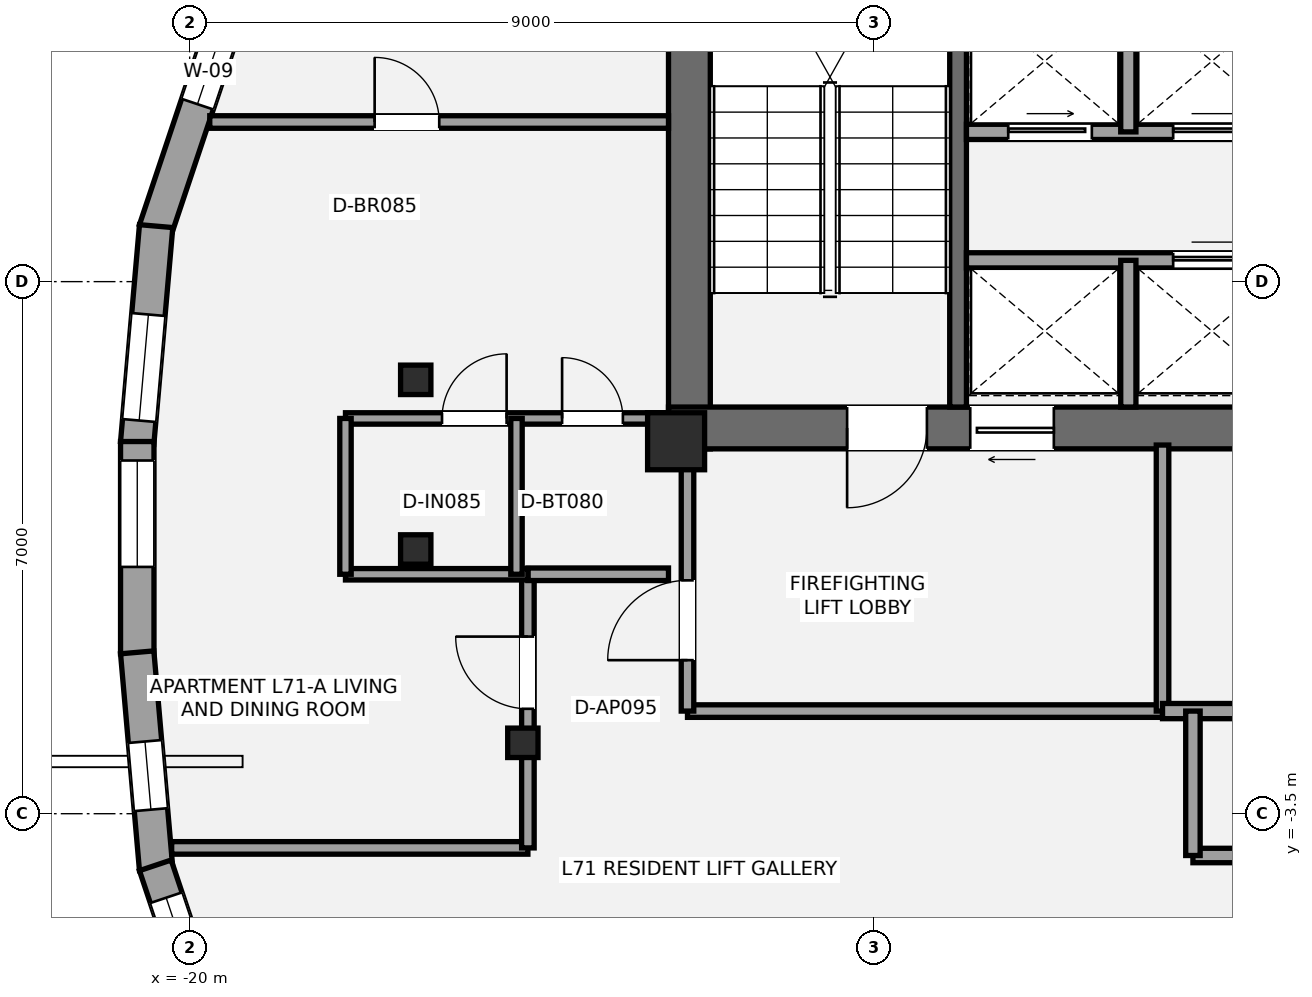
"""IFC4 building model, lengths in metres.
Left out: names, types, materials, properties, quantities, classifications, styles, units other than length and angle.
Written with IfcOpenShell. Run it as: python <this file> out.ifc"""

import sys

from ifc_helpers import new_model, si_unit, direction, frame, frame_2d, origin, origin_2d, place, context, subcontext, project, spatial, rectangle, i_section, extrude, element, fill, save


model = new_model("IFC4")
c1 = context("Model", 3, precision=1e-05, world=origin(), true_north=direction((0.0, 1.0)))
c2 = subcontext(c1, "Body", "Model", "MODEL_VIEW")
j1 = project(units=[si_unit("LENGTHUNIT", "METRE"), si_unit("PLANEANGLEUNIT", "RADIAN")], contexts=[c1])
p1 = place(None, origin())
s1 = spatial("IfcSite", under=j1, at=p1, CompositionType="ELEMENT")
p2 = place(p1, origin())
s2 = spatial("IfcBuilding", under=s1, at=p2, CompositionType="ELEMENT")
p3 = place(p2, frame((0.0, 0.0, 250.95)))
s3 = spatial("IfcBuildingStorey", under=s2, at=p3, CompositionType="ELEMENT", Elevation=250.95)
p4 = place(p3, frame((-13.425, 1.3, 0.0), z_axis=(0.0, 0.0, 1.0), x_axis=(0.0, 1.0, 0.0)))
e1 = element("IfcWall", 1, at=p4, inside=s3, PredefinedType="SHEAR", context=c2, shape_type="SweptSolid", body=[
    extrude(rectangle(XDim=8.25, YDim=0.55, at=frame_2d((4.125, 0.0))), origin(), (0.0, 0.0, 1.0), 3.15),
])
p5 = place(p3, frame((-4.925, 1.575, 0.0), z_axis=(0.0, 0.0, 1.0), x_axis=(-1.0, 0.0, 0.0)))
e2 = element("IfcWall", 2, at=p5, inside=s3, PredefinedType="SHEAR", context=c2, shape_type="SweptSolid", body=[
    extrude(rectangle(XDim=8.775, YDim=0.55, at=frame_2d((4.387, 0.0))), origin(), (0.0, 0.0, 1.0), 3.15),
])
p6 = place(p5, frame((5.375, 0.0, 0.0)))
e3 = element("IfcOpeningElement", 3, at=p6, cuts=e2, PredefinedType="OPENING", context=c2, shape_type="SweptSolid", body=[
    extrude(rectangle(XDim=1.05, YDim=2.15, at=frame_2d((0.525, 1.075))), frame((0.0, 0.285, 0.0), z_axis=(0.0, -1.0, 0.0), x_axis=(1.0, 0.0, 0.0)), (0.0, 0.0, 1.0), 0.57),
])
p7 = place(p5, frame((3.705, 0.0, 0.0)))
e4 = element("IfcOpeningElement", 4, at=p7, cuts=e2, PredefinedType="OPENING", context=c2, shape_type="SweptSolid", body=[
    extrude(rectangle(XDim=1.1, YDim=2.2, at=frame_2d((0.55, 1.1))), frame((0.0, 0.285, 0.0), z_axis=(0.0, -1.0, 0.0), x_axis=(1.0, 0.0, 0.0)), (0.0, 0.0, 1.0), 0.57),
])
p8 = place(p3, frame((-9.89, 1.85, 0.0), z_axis=(0.0, 0.0, 1.0), x_axis=(0.0, 1.0, 0.0)))
e5 = element("IfcWall", 5, at=p8, inside=s3, PredefinedType="SHEAR", context=c2, shape_type="SweptSolid", body=[
    extrude(rectangle(XDim=7.15, YDim=0.22, at=frame_2d((3.575, 0.0))), origin(), (0.0, 0.0, 1.0), 3.15),
])
p9 = place(p3, frame((-13.6, 1.4, 0.0), z_axis=(0.0, 0.0, 1.0), x_axis=(1.0, 0.0, 0.0)))
e6 = element("IfcColumn", 6, at=p9, inside=s3, PredefinedType="PILASTER", context=c2, shape_type="SweptSolid", body=[
    extrude(rectangle(XDim=0.75, YDim=0.75, at=origin_2d()), origin(), (0.0, 0.0, 1.0), 3.15),
])
for number, where, z_axis, x_axis in (
    (7, (-17.026, 2.208, 0.0), (0.0, 0.0, 1.0), (1.0, 0.0, 0.0)),
    (8, (-17.026, -0.024, 0.0), (0.0, 0.0, 1.0), (1.0, 0.0, 0.0)),
    (9, (-15.616, -2.567, 0.0), (0.0, 0.0, 1.0), (1.0, 0.0, 0.0)),
):
    element("IfcColumn", number, at=place(p3, frame(where, z_axis=z_axis, x_axis=x_axis)), inside=s3, PredefinedType="COLUMN", context=c2, shape_type="SweptSolid", body=[
        extrude(i_section(OverallWidth=0.399, OverallDepth=0.387, WebThickness=0.021, FlangeThickness=0.033, at=origin_2d()), origin(), (0.0, 0.0, 1.0), 3.15),
    ])
p10 = place(p3, frame((-20.452, 4.179, 0.0), z_axis=(0.0, 0.0, 1.0), x_axis=(0.317622332961, 0.948217302945, 0.0)))
e10 = element("IfcWall", 10, at=p10, inside=s3, PredefinedType="STANDARD", context=c2, shape_type="SweptSolid", body=[
    extrude(rectangle(XDim=3.045, YDim=0.44, at=frame_2d((1.523, 0.0))), origin(), (0.0, 0.0, 1.0), 2.336),
])
p11 = place(p10, frame((1.746, 0.0, 0.58)))
e11 = element("IfcOpeningElement", 11, at=p11, cuts=e10, PredefinedType="OPENING", context=c2, shape_type="SweptSolid", body=[
    extrude(rectangle(XDim=0.9, YDim=1.35, at=frame_2d((0.45, 0.675))), frame((0.0, 0.23, 0.0), z_axis=(0.0, -1.0, 0.0), x_axis=(1.0, 0.0, 0.0)), (0.0, 0.0, 1.0), 0.46),
])
p12 = place(p3, frame((-20.69, 1.377, 0.0), z_axis=(0.0, 0.0, 1.0), x_axis=(0.086868726907, 0.996219767062, 0.0)))
e12 = element("IfcWall", 12, at=p12, inside=s3, PredefinedType="STANDARD", context=c2, shape_type="SweptSolid", body=[
    extrude(rectangle(XDim=2.864, YDim=0.44, at=frame_2d((1.432, 0.0))), origin(), (0.0, 0.0, 1.0), 2.336),
])
p13 = place(p12, frame((0.297, 0.0, 0.58)))
e13 = element("IfcOpeningElement", 13, at=p13, cuts=e12, PredefinedType="OPENING", context=c2, shape_type="SweptSolid", body=[
    extrude(rectangle(XDim=1.4, YDim=1.55, at=frame_2d((0.7, 0.775))), frame((0.0, 0.23, 0.0), z_axis=(0.0, -1.0, 0.0), x_axis=(1.0, 0.0, 0.0)), (0.0, 0.0, 1.0), 0.46),
])
p14 = place(p3, frame((-20.689, -1.396, 0.0), z_axis=(0.0, 0.0, 1.0), x_axis=(0.0, 1.0, 0.0)))
e14 = element("IfcWall", 14, at=p14, inside=s3, PredefinedType="STANDARD", context=c2, shape_type="SweptSolid", body=[
    extrude(rectangle(XDim=2.792, YDim=0.44, at=frame_2d((1.396, 0.0))), origin(), (0.0, 0.0, 1.0), 2.336),
])
p15 = place(p14, frame((1.143, 0.0, 0.55)))
e15 = element("IfcOpeningElement", 15, at=p15, cuts=e14, PredefinedType="OPENING", context=c2, shape_type="SweptSolid", body=[
    extrude(rectangle(XDim=1.4, YDim=1.55, at=frame_2d((0.7, 0.775))), frame((0.0, 0.23, 0.0), z_axis=(0.0, -1.0, 0.0), x_axis=(1.0, 0.0, 0.0)), (0.0, 0.0, 1.0), 0.46),
])
p16 = place(p3, frame((-20.441, -4.23, 0.0), z_axis=(0.0, 0.0, 1.0), x_axis=(-0.086868726907, 0.996219767062, 0.0)))
e16 = element("IfcWall", 16, at=p16, inside=s3, PredefinedType="STANDARD", context=c2, shape_type="SweptSolid", body=[
    extrude(rectangle(XDim=2.864, YDim=0.44, at=frame_2d((1.432, 0.0))), origin(), (0.0, 0.0, 1.0), 2.336),
])
p17 = place(p16, frame((0.786, 0.0, 0.58)))
e17 = element("IfcOpeningElement", 17, at=p17, cuts=e16, PredefinedType="OPENING", context=c2, shape_type="SweptSolid", body=[
    extrude(rectangle(XDim=0.9, YDim=1.35, at=frame_2d((0.45, 0.675))), frame((0.0, 0.23, 0.0), z_axis=(0.0, -1.0, 0.0), x_axis=(1.0, 0.0, 0.0)), (0.0, 0.0, 1.0), 0.46),
])
p18 = place(p3, frame((-19.485, -7.067, 0.0), z_axis=(0.0, 0.0, 1.0), x_axis=(-0.317622332961, 0.948217302945, 0.0)))
e18 = element("IfcWall", 18, at=p18, inside=s3, PredefinedType="STANDARD", context=c2, shape_type="SweptSolid", body=[
    extrude(rectangle(XDim=3.045, YDim=0.44, at=frame_2d((1.523, 0.0))), origin(), (0.0, 0.0, 1.0), 2.336),
])
p19 = place(p18, frame((1.196, 0.0, 0.58)))
e19 = element("IfcOpeningElement", 19, at=p19, cuts=e18, PredefinedType="OPENING", context=c2, shape_type="SweptSolid", body=[
    extrude(rectangle(XDim=1.4, YDim=1.55, at=frame_2d((0.7, 0.775))), frame((0.0, 0.23, 0.0), z_axis=(0.0, -1.0, 0.0), x_axis=(1.0, 0.0, 0.0)), (0.0, 0.0, 1.0), 0.46),
])
p20 = place(p3, frame((-13.45, -2.15, 0.0), z_axis=(0.0, 0.0, 1.0), x_axis=(1.0, 0.0, 0.0)))
e20 = element("IfcWall", 20, at=p20, inside=s3, PredefinedType="PARTITIONING", context=c2, shape_type="SweptSolid", body=[
    extrude(rectangle(XDim=6.25, YDim=0.165, at=frame_2d((3.125, 0.0))), origin(), (0.0, 0.0, 1.0), 2.423),
])
p21 = place(p3, frame((-13.45, -2.15, 0.0), z_axis=(0.0, 0.0, 1.0), x_axis=(0.0, 1.0, 0.0)))
e21 = element("IfcWall", 21, at=p21, inside=s3, PredefinedType="PARTITIONING", context=c2, shape_type="SweptSolid", body=[
    extrude(rectangle(XDim=3.5, YDim=0.165, at=frame_2d((1.75, 0.0))), origin(), (0.0, 0.0, 1.0), 2.423),
])
p22 = place(p21, frame((0.67, 0.0, 0.0)))
e22 = element("IfcOpeningElement", 22, at=p22, cuts=e21, PredefinedType="OPENING", context=c2, shape_type="SweptSolid", body=[
    extrude(rectangle(XDim=1.05, YDim=2.15, at=frame_2d((0.525, 1.075))), frame((0.0, 0.093, 0.0), z_axis=(0.0, -1.0, 0.0), x_axis=(1.0, 0.0, 0.0)), (0.0, 0.0, 1.0), 0.185),
])
p23 = place(p3, frame((-7.2, -2.15, 0.0), z_axis=(0.0, 0.0, 1.0), x_axis=(0.0, 1.0, 0.0)))
e23 = element("IfcWall", 23, at=p23, inside=s3, PredefinedType="PARTITIONING", context=c2, shape_type="SweptSolid", body=[
    extrude(rectangle(XDim=3.5, YDim=0.165, at=frame_2d((1.75, 0.0))), origin(), (0.0, 0.0, 1.0), 2.423),
])
p24 = place(p3, frame((-7.2, -2.15, 0.0), z_axis=(0.0, 0.0, 1.0), x_axis=(1.0, 0.0, 0.0)))
e24 = element("IfcWall", 24, at=p24, inside=s3, PredefinedType="SOLIDWALL", context=c2, shape_type="SweptSolid", body=[
    extrude(rectangle(XDim=2.25, YDim=0.2, at=frame_2d((1.125, 0.0))), origin(), (0.0, 0.0, 1.0), 2.97),
])
p25 = place(p3, frame((-9.78, 3.78, 0.0), z_axis=(0.0, 0.0, 1.0), x_axis=(1.0, 0.0, 0.0)))
e25 = element("IfcWall", 25, at=p25, inside=s3, PredefinedType="SOLIDWALL", context=c2, shape_type="SweptSolid", body=[
    extrude(rectangle(XDim=4.305, YDim=0.2, at=frame_2d((2.152, 0.0))), origin(), (0.0, 0.0, 1.0), 2.97),
])
p26 = place(p25, frame((2.72, 0.0, 0.0)))
e26 = element("IfcOpeningElement", 26, at=p26, cuts=e25, PredefinedType="OPENING", context=c2, shape_type="SweptSolid", body=[
    extrude(rectangle(XDim=1.1, YDim=2.2, at=frame_2d((0.55, 1.1))), frame((0.0, 0.11, 0.0), z_axis=(0.0, -1.0, 0.0), x_axis=(1.0, 0.0, 0.0)), (0.0, 0.0, 1.0), 0.22),
])
p27 = place(p3, frame((-7.65, 1.85, 0.0), z_axis=(0.0, 0.0, 1.0), x_axis=(0.0, 1.0, 0.0)))
e27 = element("IfcWall", 27, at=p27, inside=s3, PredefinedType="SOLIDWALL", context=c2, shape_type="SweptSolid", body=[
    extrude(rectangle(XDim=1.93, YDim=0.2, at=frame_2d((0.965, 0.0))), origin(), (0.0, 0.0, 1.0), 2.97),
])
p28 = place(p3, frame((-9.78, 5.47, 0.0), z_axis=(0.0, 0.0, 1.0), x_axis=(1.0, 0.0, 0.0)))
e28 = element("IfcWall", 28, at=p28, inside=s3, PredefinedType="SOLIDWALL", context=c2, shape_type="SweptSolid", body=[
    extrude(rectangle(XDim=4.305, YDim=0.2, at=frame_2d((2.152, 0.0))), origin(), (0.0, 0.0, 1.0), 2.97),
])
p29 = place(p28, frame((0.55, 0.0, 0.0)))
e29 = element("IfcOpeningElement", 29, at=p29, cuts=e28, PredefinedType="OPENING", context=c2, shape_type="SweptSolid", body=[
    extrude(rectangle(XDim=1.1, YDim=2.2, at=frame_2d((0.55, 1.1))), frame((0.0, 0.11, 0.0), z_axis=(0.0, -1.0, 0.0), x_axis=(1.0, 0.0, 0.0)), (0.0, 0.0, 1.0), 0.22),
])
p30 = place(p28, frame((2.72, 0.0, 0.0)))
e30 = element("IfcOpeningElement", 30, at=p30, cuts=e28, PredefinedType="OPENING", context=c2, shape_type="SweptSolid", body=[
    extrude(rectangle(XDim=1.1, YDim=2.2, at=frame_2d((0.55, 1.1))), frame((0.0, 0.11, 0.0), z_axis=(0.0, -1.0, 0.0), x_axis=(1.0, 0.0, 0.0)), (0.0, 0.0, 1.0), 0.22),
])
p31 = place(p3, frame((-7.65, 5.47, 0.0), z_axis=(0.0, 0.0, 1.0), x_axis=(0.0, 1.0, 0.0)))
e31 = element("IfcWall", 31, at=p31, inside=s3, PredefinedType="SOLIDWALL", context=c2, shape_type="SweptSolid", body=[
    extrude(rectangle(XDim=1.86, YDim=0.2, at=frame_2d((0.93, 0.0))), origin(), (0.0, 0.0, 1.0), 2.97),
])
p32 = place(p3, frame((-6.8, -4.05, 0.0), z_axis=(0.0, 0.0, 1.0), x_axis=(1.0, 0.0, 0.0)))
e32 = element("IfcWall", 32, at=p32, inside=s3, PredefinedType="PLUMBINGWALL", context=c2, shape_type="SweptSolid", body=[
    extrude(rectangle(XDim=4.7, YDim=0.19, at=frame_2d((2.35, 0.0))), origin(), (0.0, 0.0, 1.0), 2.423),
])
p33 = place(p32, frame((1.8, 0.0, 0.0)))
e33 = element("IfcOpeningElement", 33, at=p33, cuts=e32, PredefinedType="OPENING", context=c2, shape_type="SweptSolid", body=[
    extrude(rectangle(XDim=0.95, YDim=2.15, at=frame_2d((0.475, 1.075))), frame((0.0, 0.105, 0.0), z_axis=(0.0, -1.0, 0.0), x_axis=(1.0, 0.0, 0.0)), (0.0, 0.0, 1.0), 0.21),
])
p34 = place(p3, frame((-6.8, -4.05, 0.0), z_axis=(0.0, 0.0, 1.0), x_axis=(0.0, 1.0, 0.0)))
e34 = element("IfcWall", 34, at=p34, inside=s3, PredefinedType="PLUMBINGWALL", context=c2, shape_type="SweptSolid", body=[
    extrude(rectangle(XDim=1.9, YDim=0.19, at=frame_2d((0.95, 0.0))), origin(), (0.0, 0.0, 1.0), 2.423),
])
p35 = place(p3, frame((-20.237, -3.95, 0.0), z_axis=(0.0, 0.0, 1.0), x_axis=(1.0, 0.0, 0.0)))
e35 = element("IfcWall", 35, at=p35, inside=s3, PredefinedType="PARTITIONING", context=c2, shape_type="SweptSolid", body=[
    extrude(rectangle(XDim=4.687, YDim=0.165, at=frame_2d((2.343, 0.0))), origin(), (0.0, 0.0, 1.0), 2.423),
])
p36 = place(p3, frame((-15.55, -3.95, 0.0), z_axis=(0.0, 0.0, 1.0), x_axis=(0.0, 1.0, 0.0)))
e36 = element("IfcWall", 36, at=p36, inside=s3, PredefinedType="PARTITIONING", context=c2, shape_type="SweptSolid", body=[
    extrude(rectangle(XDim=3.6, YDim=0.165, at=frame_2d((1.8, 0.0))), origin(), (0.0, 0.0, 1.0), 2.357),
])
p37 = place(p36, frame((1.83, 0.0, 0.0)))
e37 = element("IfcOpeningElement", 37, at=p37, cuts=e36, PredefinedType="OPENING", context=c2, shape_type="SweptSolid", body=[
    extrude(rectangle(XDim=0.95, YDim=2.15, at=frame_2d((0.475, 1.075))), frame((0.0, 0.093, 0.0), z_axis=(0.0, -1.0, 0.0), x_axis=(1.0, 0.0, 0.0)), (0.0, 0.0, 1.0), 0.185),
])
p38 = place(p3, frame((-15.55, -0.35, 0.0), z_axis=(0.0, 0.0, 1.0), x_axis=(1.0, 0.0, 0.0)))
e38 = element("IfcWall", 38, at=p38, inside=s3, PredefinedType="PARTITIONING", context=c2, shape_type="SweptSolid", body=[
    extrude(rectangle(XDim=1.85, YDim=0.165, at=frame_2d((0.925, 0.0))), origin(), (0.0, 0.0, 1.0), 2.423),
])
p39 = place(p3, frame((-19.736, 5.6, 0.0), z_axis=(0.0, 0.0, 1.0), x_axis=(1.0, 0.0, 0.0)))
e39 = element("IfcWall", 39, at=p39, inside=s3, PredefinedType="PARTITIONING", context=c2, shape_type="SweptSolid", body=[
    extrude(rectangle(XDim=6.036, YDim=0.165, at=frame_2d((3.018, 0.0))), origin(), (0.0, 0.0, 1.0), 2.423),
])
p40 = place(p39, frame((2.169, 0.0, 0.0)))
e40 = element("IfcOpeningElement", 40, at=p40, cuts=e39, PredefinedType="OPENING", context=c2, shape_type="SweptSolid", body=[
    extrude(rectangle(XDim=0.85, YDim=2.1, at=frame_2d((0.425, 1.05))), frame((0.0, 0.093, 0.0), z_axis=(0.0, -1.0, 0.0), x_axis=(1.0, 0.0, 0.0)), (0.0, 0.0, 1.0), 0.185),
])
p41 = place(p3, frame((-17.95, 1.7, 0.0), z_axis=(0.0, 0.0, 1.0), x_axis=(1.0, 0.0, 0.0)))
e41 = element("IfcWall", 41, at=p41, inside=s3, PredefinedType="PLUMBINGWALL", context=c2, shape_type="SweptSolid", body=[
    extrude(rectangle(XDim=4.25, YDim=0.15, at=frame_2d((2.125, 0.0))), origin(), (0.0, 0.0, 1.0), 2.423),
])
p42 = place(p41, frame((2.85, 0.0, 0.0)))
e42 = element("IfcOpeningElement", 42, at=p42, cuts=e41, PredefinedType="OPENING", context=c2, shape_type="SweptSolid", body=[
    extrude(rectangle(XDim=0.8, YDim=2.1, at=frame_2d((0.4, 1.05))), frame((0.0, 0.085, 0.0), z_axis=(0.0, -1.0, 0.0), x_axis=(1.0, 0.0, 0.0)), (0.0, 0.0, 1.0), 0.17),
])
p43 = place(p41, frame((1.27, 0.0, 0.0)))
e43 = element("IfcOpeningElement", 43, at=p43, cuts=e41, PredefinedType="OPENING", context=c2, shape_type="SweptSolid", body=[
    extrude(rectangle(XDim=0.85, YDim=2.1, at=frame_2d((0.425, 1.05))), frame((0.0, 0.085, 0.0), z_axis=(0.0, -1.0, 0.0), x_axis=(1.0, 0.0, 0.0)), (0.0, 0.0, 1.0), 0.17),
])
p44 = place(p3, frame((-17.95, -0.35, 0.0), z_axis=(0.0, 0.0, 1.0), x_axis=(1.0, 0.0, 0.0)))
e44 = element("IfcWall", 44, at=p44, inside=s3, PredefinedType="PLUMBINGWALL", context=c2, shape_type="SweptSolid", body=[
    extrude(rectangle(XDim=2.4, YDim=0.15, at=frame_2d((1.2, 0.0))), origin(), (0.0, 0.0, 1.0), 2.423),
])
p45 = place(p3, frame((-15.7, -0.35, 0.0), z_axis=(0.0, 0.0, 1.0), x_axis=(0.0, 1.0, 0.0)))
e45 = element("IfcWall", 45, at=p45, inside=s3, PredefinedType="PLUMBINGWALL", context=c2, shape_type="SweptSolid", body=[
    extrude(rectangle(XDim=2.05, YDim=0.15, at=frame_2d((1.025, 0.0))), origin(), (0.0, 0.0, 1.0), 2.97),
])
p46 = place(p3, frame((-17.95, -0.35, 0.0), z_axis=(0.0, 0.0, 1.0), x_axis=(0.0, 1.0, 0.0)))
e46 = element("IfcWall", 46, at=p46, inside=s3, PredefinedType="PLUMBINGWALL", context=c2, shape_type="SweptSolid", body=[
    extrude(rectangle(XDim=2.05, YDim=0.15, at=frame_2d((1.025, 0.0))), origin(), (0.0, 0.0, 1.0), 2.423),
])
p47 = place(p11, origin())
e47 = element("IfcWindow", 47, at=p47, inside=s3, PartitioningType="SINGLE_PANEL", PredefinedType="WINDOW", context=c2, shape_type="SweptSolid", body=[
    extrude(rectangle(XDim=0.9, YDim=1.35, at=frame_2d((0.45, 0.675))), frame((0.0, -0.01, 0.0), z_axis=(0.0, -1.0, 0.0), x_axis=(1.0, 0.0, 0.0)), (0.0, 0.0, 1.0), 0.06),
])
fill(e11, e47)
p48 = place(p13, origin())
e48 = element("IfcWindow", 48, at=p48, inside=s3, PartitioningType="SINGLE_PANEL", PredefinedType="WINDOW", context=c2, shape_type="SweptSolid", body=[
    extrude(rectangle(XDim=1.4, YDim=1.55, at=frame_2d((0.7, 0.775))), frame((0.0, -0.01, 0.0), z_axis=(0.0, -1.0, 0.0), x_axis=(1.0, 0.0, 0.0)), (0.0, 0.0, 1.0), 0.06),
])
fill(e13, e48)
p49 = place(p15, origin())
e49 = element("IfcWindow", 49, at=p49, inside=s3, PartitioningType="SINGLE_PANEL", PredefinedType="WINDOW", context=c2, shape_type="SweptSolid", body=[
    extrude(rectangle(XDim=1.4, YDim=1.55, at=frame_2d((0.7, 0.775))), frame((0.0, -0.01, 0.0), z_axis=(0.0, -1.0, 0.0), x_axis=(1.0, 0.0, 0.0)), (0.0, 0.0, 1.0), 0.06),
])
fill(e15, e49)
p50 = place(p17, origin())
e50 = element("IfcWindow", 50, at=p50, inside=s3, PartitioningType="SINGLE_PANEL", PredefinedType="WINDOW", context=c2, shape_type="SweptSolid", body=[
    extrude(rectangle(XDim=0.9, YDim=1.35, at=frame_2d((0.45, 0.675))), frame((0.0, -0.01, 0.0), z_axis=(0.0, -1.0, 0.0), x_axis=(1.0, 0.0, 0.0)), (0.0, 0.0, 1.0), 0.06),
])
fill(e17, e50)
p51 = place(p19, origin())
e51 = element("IfcWindow", 51, at=p51, inside=s3, PartitioningType="SINGLE_PANEL", PredefinedType="WINDOW", context=c2, shape_type="SweptSolid", body=[
    extrude(rectangle(XDim=1.4, YDim=1.55, at=frame_2d((0.7, 0.775))), frame((0.0, -0.01, 0.0), z_axis=(0.0, -1.0, 0.0), x_axis=(1.0, 0.0, 0.0)), (0.0, 0.0, 1.0), 0.06),
])
fill(e19, e51)
p52 = place(p6, origin())
e52 = element("IfcDoor", 52, at=p52, inside=s3, OperationType="SINGLE_SWING_RIGHT", PredefinedType="DOOR", context=c2, shape_type="SweptSolid", body=[
    extrude(rectangle(XDim=1.05, YDim=2.15, at=frame_2d((0.525, 1.075))), frame((0.0, 0.025, 0.0), z_axis=(0.0, -1.0, 0.0), x_axis=(1.0, 0.0, 0.0)), (0.0, 0.0, 1.0), 0.05),
])
fill(e3, e52)
p53 = place(p22, origin())
e53 = element("IfcDoor", 53, at=p53, inside=s3, OperationType="SINGLE_SWING_LEFT", PredefinedType="DOOR", context=c2, shape_type="SweptSolid", body=[
    extrude(rectangle(XDim=1.05, YDim=2.15, at=frame_2d((0.525, 1.075))), frame((0.0, 0.025, 0.0), z_axis=(0.0, -1.0, 0.0), x_axis=(1.0, 0.0, 0.0)), (0.0, 0.0, 1.0), 0.05),
])
fill(e22, e53)
p54 = place(p7, origin())
e54 = element("IfcDoor", 54, at=p54, inside=s3, OperationType="SLIDING_TO_LEFT", PredefinedType="DOOR", context=c2, shape_type="SweptSolid", body=[
    extrude(rectangle(XDim=1.1, YDim=2.2, at=frame_2d((0.55, 1.1))), frame((0.0, 0.025, 0.0), z_axis=(0.0, -1.0, 0.0), x_axis=(1.0, 0.0, 0.0)), (0.0, 0.0, 1.0), 0.05),
])
fill(e4, e54)
p55 = place(p29, origin())
e55 = element("IfcDoor", 55, at=p55, inside=s3, OperationType="SLIDING_TO_LEFT", PredefinedType="DOOR", context=c2, shape_type="SweptSolid", body=[
    extrude(rectangle(XDim=1.1, YDim=2.2, at=frame_2d((0.55, 1.1))), frame((0.0, 0.025, 0.0), z_axis=(0.0, -1.0, 0.0), x_axis=(1.0, 0.0, 0.0)), (0.0, 0.0, 1.0), 0.05),
])
fill(e29, e55)
p56 = place(p30, origin())
e56 = element("IfcDoor", 56, at=p56, inside=s3, OperationType="SLIDING_TO_LEFT", PredefinedType="DOOR", context=c2, shape_type="SweptSolid", body=[
    extrude(rectangle(XDim=1.1, YDim=2.2, at=frame_2d((0.55, 1.1))), frame((0.0, 0.025, 0.0), z_axis=(0.0, -1.0, 0.0), x_axis=(1.0, 0.0, 0.0)), (0.0, 0.0, 1.0), 0.05),
])
fill(e30, e56)
p57 = place(p26, origin())
e57 = element("IfcDoor", 57, at=p57, inside=s3, OperationType="SLIDING_TO_LEFT", PredefinedType="DOOR", context=c2, shape_type="SweptSolid", body=[
    extrude(rectangle(XDim=1.1, YDim=2.2, at=frame_2d((0.55, 1.1))), frame((0.0, 0.025, 0.0), z_axis=(0.0, -1.0, 0.0), x_axis=(1.0, 0.0, 0.0)), (0.0, 0.0, 1.0), 0.05),
])
fill(e26, e57)
p58 = place(p37, origin())
e58 = element("IfcDoor", 58, at=p58, inside=s3, OperationType="SINGLE_SWING_RIGHT", PredefinedType="DOOR", context=c2, shape_type="SweptSolid", body=[
    extrude(rectangle(XDim=0.95, YDim=2.15, at=frame_2d((0.475, 1.075))), frame((0.0, 0.025, 0.0), z_axis=(0.0, -1.0, 0.0), x_axis=(1.0, 0.0, 0.0)), (0.0, 0.0, 1.0), 0.05),
])
fill(e37, e58)
p59 = place(p42, origin())
e59 = element("IfcDoor", 59, at=p59, inside=s3, OperationType="SINGLE_SWING_LEFT", PredefinedType="DOOR", context=c2, shape_type="SweptSolid", body=[
    extrude(rectangle(XDim=0.8, YDim=2.1, at=frame_2d((0.4, 1.05))), frame((0.0, 0.025, 0.0), z_axis=(0.0, -1.0, 0.0), x_axis=(1.0, 0.0, 0.0)), (0.0, 0.0, 1.0), 0.05),
])
fill(e42, e59)
p60 = place(p43, origin())
e60 = element("IfcDoor", 60, at=p60, inside=s3, OperationType="SINGLE_SWING_RIGHT", PredefinedType="DOOR", context=c2, shape_type="SweptSolid", body=[
    extrude(rectangle(XDim=0.85, YDim=2.1, at=frame_2d((0.425, 1.05))), frame((0.0, 0.025, 0.0), z_axis=(0.0, -1.0, 0.0), x_axis=(1.0, 0.0, 0.0)), (0.0, 0.0, 1.0), 0.05),
])
fill(e43, e60)
p61 = place(p40, origin())
e61 = element("IfcDoor", 61, at=p61, inside=s3, OperationType="SINGLE_SWING_LEFT", PredefinedType="DOOR", context=c2, shape_type="SweptSolid", body=[
    extrude(rectangle(XDim=0.85, YDim=2.1, at=frame_2d((0.425, 1.05))), frame((0.0, 0.025, 0.0), z_axis=(0.0, -1.0, 0.0), x_axis=(1.0, 0.0, 0.0)), (0.0, 0.0, 1.0), 0.05),
])
fill(e40, e61)
save(model, sys.argv[1])
